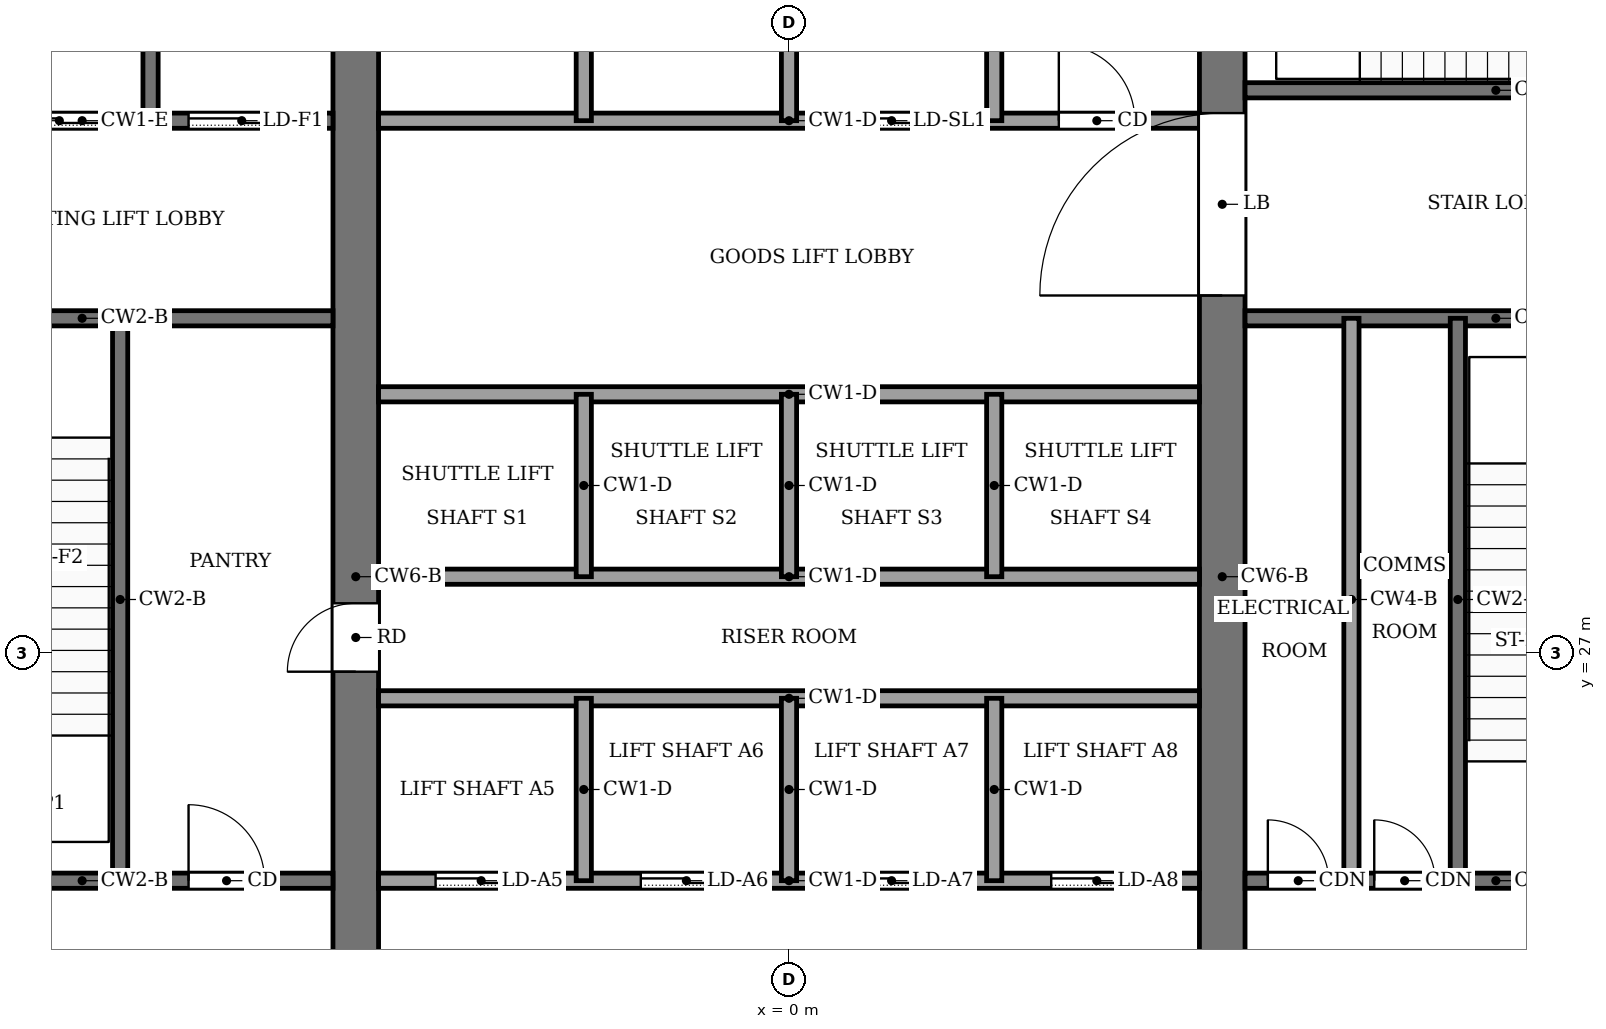
"""IFC4 building model, lengths in metres.
Left out: names, types, materials, properties, quantities, classifications, styles, units other than length and angle.
Written with IfcOpenShell. Run it as: python <this file> out.ifc"""

import sys

from ifc_helpers import new_model, si_unit, direction, frame, frame_2d, origin, place, context, subcontext, project, spatial, rectangle, extrude, element, fill, save


model = new_model("IFC4")
c1 = context("Model", 3, precision=1e-05, world=origin(), true_north=direction((0.0, 1.0)))
c2 = subcontext(c1, "Body", "Model", "MODEL_VIEW")
j1 = project(units=[si_unit("LENGTHUNIT", "METRE"), si_unit("PLANEANGLEUNIT", "RADIAN")], contexts=[c1])
p1 = place(None, origin())
s1 = spatial("IfcSite", under=j1, at=p1, CompositionType="ELEMENT")
p2 = place(p1, origin())
s2 = spatial("IfcBuilding", under=s1, at=p2, CompositionType="ELEMENT")
p3 = place(p2, frame((0.0, 0.0, 121.0)))
s3 = spatial("IfcBuildingStorey", under=s2, at=p3, CompositionType="ELEMENT", Elevation=121.0)
p4 = place(p3, frame((-5.7, 18.4, -0.13), z_axis=(0.0, 0.0, 1.0), x_axis=(0.0, 1.0, 0.0)))
e1 = element("IfcWall", 1, at=p4, inside=s3, PredefinedType="SHEAR", context=c2, shape_type="SweptSolid", body=[
    extrude(rectangle(XDim=19.2, YDim=0.6, at=frame_2d((9.6, 0.0))), origin(), (0.0, 0.0, 1.0), 5.0),
])
p5 = place(p4, frame((8.35, 0.0, 0.13)))
e2 = element("IfcOpeningElement", 2, at=p5, cuts=e1, PredefinedType="OPENING", context=c2, shape_type="SweptSolid", body=[
    extrude(rectangle(XDim=0.9, YDim=2.1, at=frame_2d((0.45, 1.05))), frame((0.0, 0.31, 0.0), z_axis=(0.0, -1.0, 0.0), x_axis=(1.0, 0.0, 0.0)), (0.0, 0.0, 1.0), 0.62),
])
p6 = place(p3, frame((5.7, 18.4, -0.13), z_axis=(0.0, 0.0, 1.0), x_axis=(0.0, 1.0, 0.0)))
e3 = element("IfcWall", 3, at=p6, inside=s3, PredefinedType="SHEAR", context=c2, shape_type="SweptSolid", body=[
    extrude(rectangle(XDim=19.2, YDim=0.6, at=frame_2d((9.6, 0.0))), origin(), (0.0, 0.0, 1.0), 5.0),
])
p7 = place(p6, frame((13.3, 0.0, 0.13)))
e4 = element("IfcOpeningElement", 4, at=p7, cuts=e3, PredefinedType="OPENING", context=c2, shape_type="SweptSolid", body=[
    extrude(rectangle(XDim=2.4, YDim=2.4, at=frame_2d((1.2, 1.2))), frame((0.0, 0.31, 0.0), z_axis=(0.0, -1.0, 0.0), x_axis=(1.0, 0.0, 0.0)), (0.0, 0.0, 1.0), 0.62),
])
p8 = place(p3, frame((-12.6, 24.0, 0.0), z_axis=(0.0, 0.0, 1.0), x_axis=(1.0, 0.0, 0.0)))
e5 = element("IfcWall", 5, at=p8, inside=s3, PredefinedType="PARTITIONING", context=c2, shape_type="SweptSolid", body=[
    extrude(rectangle(XDim=6.6, YDim=0.2, at=frame_2d((3.3, 0.0))), origin(), (0.0, 0.0, 1.0), 4.87),
])
p9 = place(p8, frame((4.7, 0.0, 0.0)))
e6 = element("IfcOpeningElement", 6, at=p9, cuts=e5, PredefinedType="OPENING", context=c2, shape_type="SweptSolid", body=[
    extrude(rectangle(XDim=1.0, YDim=2.1, at=frame_2d((0.5, 1.05))), frame((0.0, 0.11, 0.0), z_axis=(0.0, -1.0, 0.0), x_axis=(1.0, 0.0, 0.0)), (0.0, 0.0, 1.0), 0.22),
])
p10 = place(p3, frame((-5.4, 24.0, 0.0), z_axis=(0.0, 0.0, 1.0), x_axis=(1.0, 0.0, 0.0)))
e7 = element("IfcWall", 7, at=p10, inside=s3, PredefinedType="PARTITIONING", context=c2, shape_type="SweptSolid", body=[
    extrude(rectangle(XDim=10.8, YDim=0.2, at=frame_2d((5.4, 0.0))), origin(), (0.0, 0.0, 1.0), 4.87),
])
p11 = place(p10, frame((0.75, 0.0, 0.0)))
e8 = element("IfcOpeningElement", 8, at=p11, cuts=e7, PredefinedType="OPENING", context=c2, shape_type="SweptSolid", body=[
    extrude(rectangle(XDim=1.2, YDim=2.2, at=frame_2d((0.6, 1.1))), frame((0.0, 0.11, 0.0), z_axis=(0.0, -1.0, 0.0), x_axis=(1.0, 0.0, 0.0)), (0.0, 0.0, 1.0), 0.22),
])
p12 = place(p10, frame((3.45, 0.0, 0.0)))
e9 = element("IfcOpeningElement", 9, at=p12, cuts=e7, PredefinedType="OPENING", context=c2, shape_type="SweptSolid", body=[
    extrude(rectangle(XDim=1.2, YDim=2.2, at=frame_2d((0.6, 1.1))), frame((0.0, 0.11, 0.0), z_axis=(0.0, -1.0, 0.0), x_axis=(1.0, 0.0, 0.0)), (0.0, 0.0, 1.0), 0.22),
])
p13 = place(p10, frame((6.15, 0.0, 0.0)))
e10 = element("IfcOpeningElement", 10, at=p13, cuts=e7, PredefinedType="OPENING", context=c2, shape_type="SweptSolid", body=[
    extrude(rectangle(XDim=1.2, YDim=2.2, at=frame_2d((0.6, 1.1))), frame((0.0, 0.11, 0.0), z_axis=(0.0, -1.0, 0.0), x_axis=(1.0, 0.0, 0.0)), (0.0, 0.0, 1.0), 0.22),
])
p14 = place(p10, frame((8.85, 0.0, 0.0)))
e11 = element("IfcOpeningElement", 11, at=p14, cuts=e7, PredefinedType="OPENING", context=c2, shape_type="SweptSolid", body=[
    extrude(rectangle(XDim=1.2, YDim=2.2, at=frame_2d((0.6, 1.1))), frame((0.0, 0.11, 0.0), z_axis=(0.0, -1.0, 0.0), x_axis=(1.0, 0.0, 0.0)), (0.0, 0.0, 1.0), 0.22),
])
p15 = place(p3, frame((6.0, 24.0, 0.0), z_axis=(0.0, 0.0, 1.0), x_axis=(1.0, 0.0, 0.0)))
e12 = element("IfcWall", 12, at=p15, inside=s3, PredefinedType="PARTITIONING", context=c2, shape_type="SweptSolid", body=[
    extrude(rectangle(XDim=6.6, YDim=0.2, at=frame_2d((3.3, 0.0))), origin(), (0.0, 0.0, 1.0), 4.87),
])
p16 = place(p15, frame((0.3, 0.0, 0.0)))
e13 = element("IfcOpeningElement", 13, at=p16, cuts=e12, PredefinedType="OPENING", context=c2, shape_type="SweptSolid", body=[
    extrude(rectangle(XDim=0.8, YDim=2.1, at=frame_2d((0.4, 1.05))), frame((0.0, 0.11, 0.0), z_axis=(0.0, -1.0, 0.0), x_axis=(1.0, 0.0, 0.0)), (0.0, 0.0, 1.0), 0.22),
])
p17 = place(p15, frame((1.7, 0.0, 0.0)))
e14 = element("IfcOpeningElement", 14, at=p17, cuts=e12, PredefinedType="OPENING", context=c2, shape_type="SweptSolid", body=[
    extrude(rectangle(XDim=0.8, YDim=2.1, at=frame_2d((0.4, 1.05))), frame((0.0, 0.11, 0.0), z_axis=(0.0, -1.0, 0.0), x_axis=(1.0, 0.0, 0.0)), (0.0, 0.0, 1.0), 0.22),
])
p18 = place(p15, frame((4.4, 0.0, 0.0)))
e15 = element("IfcOpeningElement", 15, at=p18, cuts=e12, PredefinedType="OPENING", context=c2, shape_type="SweptSolid", body=[
    extrude(rectangle(XDim=1.2, YDim=2.2, at=frame_2d((0.6, 1.1))), frame((0.0, 0.11, 0.0), z_axis=(0.0, -1.0, 0.0), x_axis=(1.0, 0.0, 0.0)), (0.0, 0.0, 1.0), 0.22),
])
for number, where, z_axis, x_axis in (
    (16, (-5.4, 26.4, 0.0), (0.0, 0.0, 1.0), (1.0, 0.0, 0.0)),
    (17, (-5.4, 28.0, 0.0), (0.0, 0.0, 1.0), (1.0, 0.0, 0.0)),
    (18, (-5.4, 30.4, 0.0), (0.0, 0.0, 1.0), (1.0, 0.0, 0.0)),
):
    element("IfcWall", number, at=place(p3, frame(where, z_axis=z_axis, x_axis=x_axis)), inside=s3, PredefinedType="PARTITIONING", context=c2, shape_type="SweptSolid", body=[
        extrude(rectangle(XDim=10.8, YDim=0.2, at=frame_2d((5.4, 0.0))), origin(), (0.0, 0.0, 1.0), 4.87),
    ])
p19 = place(p3, frame((-12.6, 31.4, 0.0), z_axis=(0.0, 0.0, 1.0), x_axis=(1.0, 0.0, 0.0)))
e19 = element("IfcWall", 19, at=p19, inside=s3, PredefinedType="PARTITIONING", context=c2, shape_type="SweptSolid", body=[
    extrude(rectangle(XDim=6.6, YDim=0.2, at=frame_2d((3.3, 0.0))), origin(), (0.0, 0.0, 1.0), 4.87),
])
p20 = place(p19, frame((1.0, 0.0, 0.0)))
e20 = element("IfcOpeningElement", 20, at=p20, cuts=e19, PredefinedType="OPENING", context=c2, shape_type="SweptSolid", body=[
    extrude(rectangle(XDim=1.2, YDim=2.2, at=frame_2d((0.6, 1.1))), frame((0.0, 0.11, 0.0), z_axis=(0.0, -1.0, 0.0), x_axis=(1.0, 0.0, 0.0)), (0.0, 0.0, 1.0), 0.22),
])
p21 = place(p3, frame((6.0, 31.4, 0.0), z_axis=(0.0, 0.0, 1.0), x_axis=(1.0, 0.0, 0.0)))
e21 = element("IfcWall", 21, at=p21, inside=s3, PredefinedType="PARTITIONING", context=c2, shape_type="SweptSolid", body=[
    extrude(rectangle(XDim=6.6, YDim=0.2, at=frame_2d((3.3, 0.0))), origin(), (0.0, 0.0, 1.0), 4.87),
])
p22 = place(p3, frame((-12.6, 34.0, 0.0), z_axis=(0.0, 0.0, 1.0), x_axis=(1.0, 0.0, 0.0)))
e22 = element("IfcWall", 22, at=p22, inside=s3, PredefinedType="PARTITIONING", context=c2, shape_type="SweptSolid", body=[
    extrude(rectangle(XDim=6.6, YDim=0.2, at=frame_2d((3.3, 0.0))), origin(), (0.0, 0.0, 1.0), 4.87),
])
p23 = place(p22, frame((4.7, 0.0, 0.0)))
e23 = element("IfcOpeningElement", 23, at=p23, cuts=e22, PredefinedType="OPENING", context=c2, shape_type="SweptSolid", body=[
    extrude(rectangle(XDim=1.4, YDim=2.2, at=frame_2d((0.7, 1.1))), frame((0.0, 0.11, 0.0), z_axis=(0.0, -1.0, 0.0), x_axis=(1.0, 0.0, 0.0)), (0.0, 0.0, 1.0), 0.22),
])
p24 = place(p22, frame((2.3, 0.0, 0.0)))
e24 = element("IfcOpeningElement", 24, at=p24, cuts=e22, PredefinedType="OPENING", context=c2, shape_type="SweptSolid", body=[
    extrude(rectangle(XDim=1.4, YDim=2.2, at=frame_2d((0.7, 1.1))), frame((0.0, 0.11, 0.0), z_axis=(0.0, -1.0, 0.0), x_axis=(1.0, 0.0, 0.0)), (0.0, 0.0, 1.0), 0.22),
])
p25 = place(p22, frame((0.45, 0.0, 0.0)))
e25 = element("IfcOpeningElement", 25, at=p25, cuts=e22, PredefinedType="OPENING", context=c2, shape_type="SweptSolid", body=[
    extrude(rectangle(XDim=0.9, YDim=2.1, at=frame_2d((0.45, 1.05))), frame((0.0, 0.11, 0.0), z_axis=(0.0, -1.0, 0.0), x_axis=(1.0, 0.0, 0.0)), (0.0, 0.0, 1.0), 0.22),
])
p26 = place(p3, frame((-5.4, 34.0, 0.0), z_axis=(0.0, 0.0, 1.0), x_axis=(1.0, 0.0, 0.0)))
e26 = element("IfcWall", 26, at=p26, inside=s3, PredefinedType="PARTITIONING", context=c2, shape_type="SweptSolid", body=[
    extrude(rectangle(XDim=10.8, YDim=0.2, at=frame_2d((5.4, 0.0))), origin(), (0.0, 0.0, 1.0), 4.87),
])
p27 = place(p26, frame((6.15, 0.0, 0.0)))
e27 = element("IfcOpeningElement", 27, at=p27, cuts=e26, PredefinedType="OPENING", context=c2, shape_type="SweptSolid", body=[
    extrude(rectangle(XDim=1.2, YDim=2.2, at=frame_2d((0.6, 1.1))), frame((0.0, 0.11, 0.0), z_axis=(0.0, -1.0, 0.0), x_axis=(1.0, 0.0, 0.0)), (0.0, 0.0, 1.0), 0.22),
])
p28 = place(p26, frame((8.95, 0.0, 0.0)))
e28 = element("IfcOpeningElement", 28, at=p28, cuts=e26, PredefinedType="OPENING", context=c2, shape_type="SweptSolid", body=[
    extrude(rectangle(XDim=1.0, YDim=2.1, at=frame_2d((0.5, 1.05))), frame((0.0, 0.11, 0.0), z_axis=(0.0, -1.0, 0.0), x_axis=(1.0, 0.0, 0.0)), (0.0, 0.0, 1.0), 0.22),
])
p29 = place(p3, frame((6.0, 34.4, 0.0), z_axis=(0.0, 0.0, 1.0), x_axis=(1.0, 0.0, 0.0)))
e29 = element("IfcWall", 29, at=p29, inside=s3, PredefinedType="PARTITIONING", context=c2, shape_type="SweptSolid", body=[
    extrude(rectangle(XDim=6.6, YDim=0.2, at=frame_2d((3.3, 0.0))), origin(), (0.0, 0.0, 1.0), 4.87),
])
p30 = place(p29, frame((4.8, 0.0, 0.0)))
e30 = element("IfcOpeningElement", 30, at=p30, cuts=e29, PredefinedType="OPENING", context=c2, shape_type="SweptSolid", body=[
    extrude(rectangle(XDim=1.2, YDim=2.2, at=frame_2d((0.6, 1.1))), frame((0.0, 0.11, 0.0), z_axis=(0.0, -1.0, 0.0), x_axis=(1.0, 0.0, 0.0)), (0.0, 0.0, 1.0), 0.22),
])
p31 = place(p3, frame((-8.8, 24.0, 0.0), z_axis=(0.0, 0.0, 1.0), x_axis=(0.0, 1.0, 0.0)))
e31 = element("IfcWall", 31, at=p31, inside=s3, PredefinedType="PARTITIONING", context=c2, shape_type="SweptSolid", body=[
    extrude(rectangle(XDim=7.4, YDim=0.2, at=frame_2d((3.7, 0.0))), origin(), (0.0, 0.0, 1.0), 4.87),
])
p32 = place(p3, frame((-8.4, 34.0, 0.0), z_axis=(0.0, 0.0, 1.0), x_axis=(0.0, 1.0, 0.0)))
e32 = element("IfcWall", 32, at=p32, inside=s3, PredefinedType="PARTITIONING", context=c2, shape_type="SweptSolid", body=[
    extrude(rectangle(XDim=3.6, YDim=0.2, at=frame_2d((1.8, 0.0))), origin(), (0.0, 0.0, 1.0), 4.87),
])
for number, where, z_axis, x_axis in (
    (33, (-2.7, 24.0, 0.0), (0.0, 0.0, 1.0), (0.0, 1.0, 0.0)),
    (34, (-2.7, 28.0, 0.0), (0.0, 0.0, 1.0), (0.0, 1.0, 0.0)),
):
    element("IfcWall", number, at=place(p3, frame(where, z_axis=z_axis, x_axis=x_axis)), inside=s3, PredefinedType="PARTITIONING", context=c2, shape_type="SweptSolid", body=[
        extrude(rectangle(XDim=2.4, YDim=0.2, at=frame_2d((1.2, 0.0))), origin(), (0.0, 0.0, 1.0), 4.87),
    ])
p33 = place(p3, frame((-2.7, 34.0, 0.0), z_axis=(0.0, 0.0, 1.0), x_axis=(0.0, 1.0, 0.0)))
e35 = element("IfcWall", 35, at=p33, inside=s3, PredefinedType="PARTITIONING", context=c2, shape_type="SweptSolid", body=[
    extrude(rectangle(XDim=3.6, YDim=0.2, at=frame_2d((1.8, 0.0))), origin(), (0.0, 0.0, 1.0), 4.87),
])
for number, where, z_axis, x_axis in (
    (36, (0.0, 24.0, 0.0), (0.0, 0.0, 1.0), (0.0, 1.0, 0.0)),
    (37, (0.0, 28.0, 0.0), (0.0, 0.0, 1.0), (0.0, 1.0, 0.0)),
):
    element("IfcWall", number, at=place(p3, frame(where, z_axis=z_axis, x_axis=x_axis)), inside=s3, PredefinedType="PARTITIONING", context=c2, shape_type="SweptSolid", body=[
        extrude(rectangle(XDim=2.4, YDim=0.2, at=frame_2d((1.2, 0.0))), origin(), (0.0, 0.0, 1.0), 4.87),
    ])
p34 = place(p3, frame((0.0, 34.0, 0.0), z_axis=(0.0, 0.0, 1.0), x_axis=(0.0, 1.0, 0.0)))
e38 = element("IfcWall", 38, at=p34, inside=s3, PredefinedType="PARTITIONING", context=c2, shape_type="SweptSolid", body=[
    extrude(rectangle(XDim=3.6, YDim=0.2, at=frame_2d((1.8, 0.0))), origin(), (0.0, 0.0, 1.0), 4.87),
])
for number, where, z_axis, x_axis in (
    (39, (2.7, 24.0, 0.0), (0.0, 0.0, 1.0), (0.0, 1.0, 0.0)),
    (40, (2.7, 28.0, 0.0), (0.0, 0.0, 1.0), (0.0, 1.0, 0.0)),
):
    element("IfcWall", number, at=place(p3, frame(where, z_axis=z_axis, x_axis=x_axis)), inside=s3, PredefinedType="PARTITIONING", context=c2, shape_type="SweptSolid", body=[
        extrude(rectangle(XDim=2.4, YDim=0.2, at=frame_2d((1.2, 0.0))), origin(), (0.0, 0.0, 1.0), 4.87),
    ])
p35 = place(p3, frame((2.7, 34.0, 0.0), z_axis=(0.0, 0.0, 1.0), x_axis=(0.0, 1.0, 0.0)))
e41 = element("IfcWall", 41, at=p35, inside=s3, PredefinedType="PARTITIONING", context=c2, shape_type="SweptSolid", body=[
    extrude(rectangle(XDim=3.6, YDim=0.2, at=frame_2d((1.8, 0.0))), origin(), (0.0, 0.0, 1.0), 4.87),
])
for number, where, z_axis, x_axis in (
    (42, (7.4, 24.0, 0.0), (0.0, 0.0, 1.0), (0.0, 1.0, 0.0)),
    (43, (8.8, 24.0, 0.0), (0.0, 0.0, 1.0), (0.0, 1.0, 0.0)),
):
    element("IfcWall", number, at=place(p3, frame(where, z_axis=z_axis, x_axis=x_axis)), inside=s3, PredefinedType="PARTITIONING", context=c2, shape_type="SweptSolid", body=[
        extrude(rectangle(XDim=7.4, YDim=0.2, at=frame_2d((3.7, 0.0))), origin(), (0.0, 0.0, 1.0), 4.87),
    ])
p36 = place(p11, origin())
e44 = element("IfcDoor", 44, at=p36, inside=s3, OperationType="SLIDING_TO_LEFT", PredefinedType="DOOR", context=c2, shape_type="SweptSolid", body=[
    extrude(rectangle(XDim=1.2, YDim=2.2, at=frame_2d((0.6, 1.1))), frame((0.0, 0.025, 0.0), z_axis=(0.0, -1.0, 0.0), x_axis=(1.0, 0.0, 0.0)), (0.0, 0.0, 1.0), 0.05),
])
fill(e8, e44)
p37 = place(p12, origin())
e45 = element("IfcDoor", 45, at=p37, inside=s3, OperationType="SLIDING_TO_LEFT", PredefinedType="DOOR", context=c2, shape_type="SweptSolid", body=[
    extrude(rectangle(XDim=1.2, YDim=2.2, at=frame_2d((0.6, 1.1))), frame((0.0, 0.025, 0.0), z_axis=(0.0, -1.0, 0.0), x_axis=(1.0, 0.0, 0.0)), (0.0, 0.0, 1.0), 0.05),
])
fill(e9, e45)
p38 = place(p13, origin())
e46 = element("IfcDoor", 46, at=p38, inside=s3, OperationType="SLIDING_TO_LEFT", PredefinedType="DOOR", context=c2, shape_type="SweptSolid", body=[
    extrude(rectangle(XDim=1.2, YDim=2.2, at=frame_2d((0.6, 1.1))), frame((0.0, 0.025, 0.0), z_axis=(0.0, -1.0, 0.0), x_axis=(1.0, 0.0, 0.0)), (0.0, 0.0, 1.0), 0.05),
])
fill(e10, e46)
p39 = place(p14, origin())
e47 = element("IfcDoor", 47, at=p39, inside=s3, OperationType="SLIDING_TO_LEFT", PredefinedType="DOOR", context=c2, shape_type="SweptSolid", body=[
    extrude(rectangle(XDim=1.2, YDim=2.2, at=frame_2d((0.6, 1.1))), frame((0.0, 0.025, 0.0), z_axis=(0.0, -1.0, 0.0), x_axis=(1.0, 0.0, 0.0)), (0.0, 0.0, 1.0), 0.05),
])
fill(e11, e47)
p40 = place(p27, origin())
e48 = element("IfcDoor", 48, at=p40, inside=s3, OperationType="SLIDING_TO_LEFT", PredefinedType="DOOR", context=c2, shape_type="SweptSolid", body=[
    extrude(rectangle(XDim=1.2, YDim=2.2, at=frame_2d((0.6, 1.1))), frame((0.0, 0.025, 0.0), z_axis=(0.0, -1.0, 0.0), x_axis=(1.0, 0.0, 0.0)), (0.0, 0.0, 1.0), 0.05),
])
fill(e27, e48)
p41 = place(p23, origin())
e49 = element("IfcDoor", 49, at=p41, inside=s3, OperationType="SLIDING_TO_LEFT", PredefinedType="DOOR", context=c2, shape_type="SweptSolid", body=[
    extrude(rectangle(XDim=1.4, YDim=2.2, at=frame_2d((0.7, 1.1))), frame((0.0, 0.025, 0.0), z_axis=(0.0, -1.0, 0.0), x_axis=(1.0, 0.0, 0.0)), (0.0, 0.0, 1.0), 0.05),
])
fill(e23, e49)
p42 = place(p24, origin())
e50 = element("IfcDoor", 50, at=p42, inside=s3, OperationType="SLIDING_TO_LEFT", PredefinedType="DOOR", context=c2, shape_type="SweptSolid", body=[
    extrude(rectangle(XDim=1.4, YDim=2.2, at=frame_2d((0.7, 1.1))), frame((0.0, 0.025, 0.0), z_axis=(0.0, -1.0, 0.0), x_axis=(1.0, 0.0, 0.0)), (0.0, 0.0, 1.0), 0.05),
])
fill(e24, e50)
p43 = place(p9, origin())
e51 = element("IfcDoor", 51, at=p43, inside=s3, OperationType="SINGLE_SWING_LEFT", PredefinedType="DOOR", context=c2, shape_type="SweptSolid", body=[
    extrude(rectangle(XDim=1.0, YDim=2.1, at=frame_2d((0.5, 1.05))), frame((0.0, 0.025, 0.0), z_axis=(0.0, -1.0, 0.0), x_axis=(1.0, 0.0, 0.0)), (0.0, 0.0, 1.0), 0.05),
])
fill(e6, e51)
p44 = place(p16, origin())
e52 = element("IfcDoor", 52, at=p44, inside=s3, OperationType="SINGLE_SWING_LEFT", PredefinedType="DOOR", context=c2, shape_type="SweptSolid", body=[
    extrude(rectangle(XDim=0.8, YDim=2.1, at=frame_2d((0.4, 1.05))), frame((0.0, 0.025, 0.0), z_axis=(0.0, -1.0, 0.0), x_axis=(1.0, 0.0, 0.0)), (0.0, 0.0, 1.0), 0.05),
])
fill(e13, e52)
p45 = place(p17, origin())
e53 = element("IfcDoor", 53, at=p45, inside=s3, OperationType="SINGLE_SWING_RIGHT", PredefinedType="DOOR", context=c2, shape_type="SweptSolid", body=[
    extrude(rectangle(XDim=0.8, YDim=2.1, at=frame_2d((0.4, 1.05))), frame((0.0, 0.025, 0.0), z_axis=(0.0, -1.0, 0.0), x_axis=(1.0, 0.0, 0.0)), (0.0, 0.0, 1.0), 0.05),
])
fill(e14, e53)
p46 = place(p28, origin())
e54 = element("IfcDoor", 54, at=p46, inside=s3, OperationType="SINGLE_SWING_LEFT", PredefinedType="DOOR", context=c2, shape_type="SweptSolid", body=[
    extrude(rectangle(XDim=1.0, YDim=2.1, at=frame_2d((0.5, 1.05))), frame((0.0, 0.025, 0.0), z_axis=(0.0, -1.0, 0.0), x_axis=(1.0, 0.0, 0.0)), (0.0, 0.0, 1.0), 0.05),
])
fill(e28, e54)
p47 = place(p5, origin())
e55 = element("IfcDoor", 55, at=p47, inside=s3, OperationType="SINGLE_SWING_RIGHT", PredefinedType="DOOR", context=c2, shape_type="SweptSolid", body=[
    extrude(rectangle(XDim=0.9, YDim=2.1, at=frame_2d((0.45, 1.05))), frame((0.0, 0.025, 0.0), z_axis=(0.0, -1.0, 0.0), x_axis=(1.0, 0.0, 0.0)), (0.0, 0.0, 1.0), 0.05),
])
fill(e2, e55)
p48 = place(p7, origin())
e56 = element("IfcDoor", 56, at=p48, inside=s3, OperationType="DOUBLE_DOOR_SINGLE_SWING", PredefinedType="DOOR", context=c2, shape_type="SweptSolid", body=[
    extrude(rectangle(XDim=2.4, YDim=2.4, at=frame_2d((1.2, 1.2))), frame((0.0, 0.025, 0.0), z_axis=(0.0, -1.0, 0.0), x_axis=(1.0, 0.0, 0.0)), (0.0, 0.0, 1.0), 0.05),
])
fill(e4, e56)
save(model, sys.argv[1])
